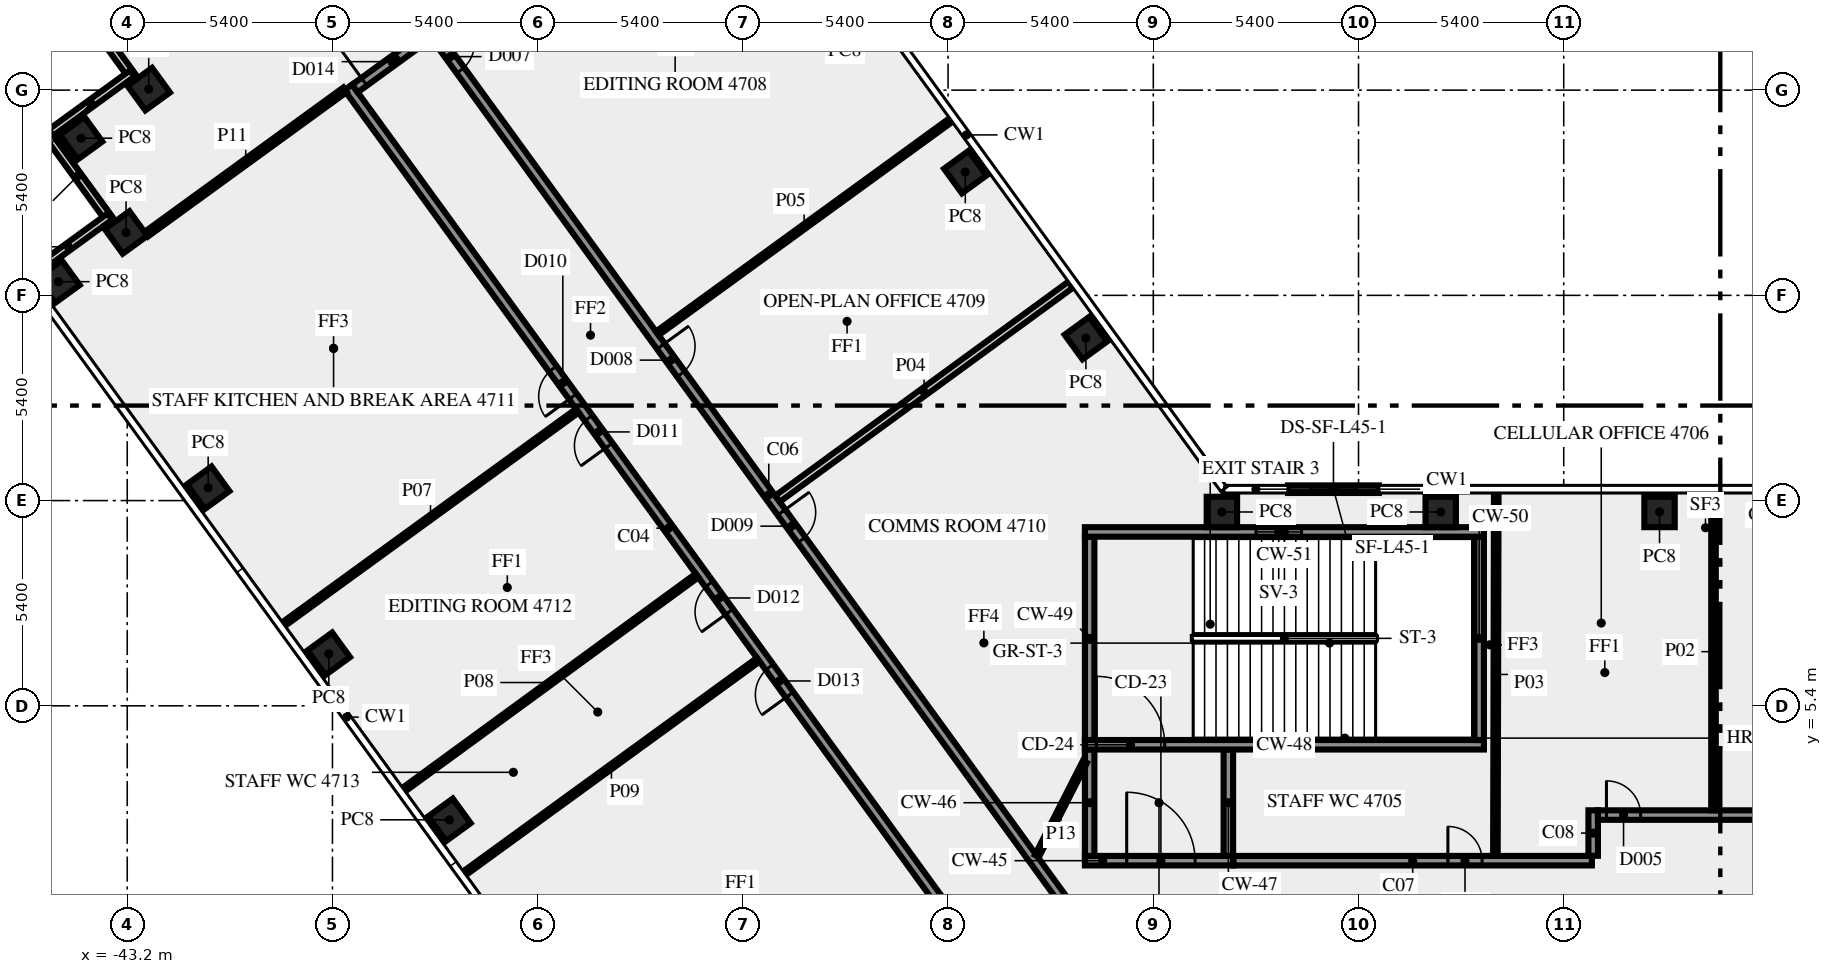
"""IFC4 building model, lengths in metres.
Left out: names, types, materials, properties, quantities, classifications, styles, units other than length and angle.
Written with IfcOpenShell. Run it as: python <this file> out.ifc"""

import sys

from ifc_helpers import new_model, si_unit, direction, frame, frame_2d, origin, origin_2d, place, context, subcontext, project, spatial, rectangle, extrude, element, fill, save


model = new_model("IFC4")
c1 = context("Model", 3, precision=1e-05, world=origin(), true_north=direction((0.0, 1.0)))
c2 = subcontext(c1, "Body", "Model", "MODEL_VIEW")
j1 = project(units=[si_unit("LENGTHUNIT", "METRE"), si_unit("PLANEANGLEUNIT", "RADIAN")], contexts=[c1])
p1 = place(None, origin())
s1 = spatial("IfcSite", under=j1, at=p1, CompositionType="ELEMENT")
p2 = place(p1, origin())
s2 = spatial("IfcBuilding", under=s1, at=p2, CompositionType="ELEMENT")
p3 = place(p2, frame((0.0, 0.0, 202.0)))
s3 = spatial("IfcBuildingStorey", under=s2, at=p3, CompositionType="ELEMENT", Elevation=202.0)
for number, where, z_axis, x_axis in (
    (1, (-17.974, 15.075, 0.0), (0.0, 0.0, 1.0), (-0.588, 0.809, 0.0)),
    (2, (-21.147, 19.444, 0.0), (0.0, 0.0, 1.0), (-0.588, 0.809, 0.0)),
    (3, (-42.635, 21.626, 0.0), (0.0, 0.0, 1.0), (-0.809, -0.588, 0.0)),
    (4, (-44.415, 20.335, 0.0), (0.0, 0.0, 1.0), (0.588, -0.809, 0.0)),
    (5, (-43.231, 17.854, 0.0), (0.0, 0.0, 1.0), (0.588, -0.809, 0.0)),
    (6, (-45.01, 16.56, 0.0), (0.0, 0.0, 1.0), (0.588, -0.809, 0.0)),
    (7, (-41.07, 11.137, 0.0), (0.0, 0.0, 1.0), (0.588, -0.809, 0.0)),
    (8, (-37.896, 6.769, 0.0), (0.0, 0.0, 1.0), (0.588, -0.809, 0.0)),
    (9, (-34.722, 2.4, 0.0), (0.0, 0.0, 1.0), (0.588, -0.809, 0.0)),
    (10, (-2.879, 10.5, 0.0), (0.0, 0.0, 1.0), (-1.0, 0.0, 0.0)),
    (11, (-8.637, 10.5, 0.0), (0.0, 0.0, 1.0), (-1.0, 0.0, 0.0)),
    (12, (-14.395, 10.5, 0.0), (0.0, 0.0, 1.0), (-1.0, 0.0, 0.0)),
):
    element("IfcColumn", number, at=place(p3, frame(where, z_axis=z_axis, x_axis=x_axis)), inside=s3, PredefinedType="COLUMN", context=c2, shape_type="SweptSolid", body=[
        extrude(rectangle(XDim=0.8, YDim=0.8, at=origin_2d()), origin(), (0.0, 0.0, 1.0), 3.65),
    ])
p4 = place(p3, frame((-10.263, 11.1, 0.0), z_axis=(0.0, 0.0, 1.0), x_axis=(-1.0, 0.0, 0.0)))
e13 = element("IfcWall", 13, at=p4, inside=s3, PredefinedType="SOLIDWALL", context=c2, shape_type="SweptSolid", body=[
    extrude(rectangle(XDim=2.392, YDim=0.2, at=frame_2d((1.196, 0.0))), origin(), (0.0, 0.0, 1.0), 3.65),
])
p5 = place(p4, frame((0.596, 0.0, 1.0)))
e14 = element("IfcOpeningElement", 14, at=p5, cuts=e13, PredefinedType="OPENING", context=c2, shape_type="SweptSolid", body=[
    extrude(rectangle(XDim=1.2, YDim=1.2, at=frame_2d((0.6, 0.6))), frame((0.0, 0.11, 0.0), z_axis=(0.0, -1.0, 0.0), x_axis=(1.0, 0.0, 0.0)), (0.0, 0.0, 1.0), 0.22),
])
for number, where, z_axis, x_axis in (
    (15, (-44.699, 24.205, 0.0), (0.0, 0.0, 1.0), (0.588, -0.809, 0.0)),
    (16, (-43.061, 22.043, 0.0), (0.0, 0.0, 1.0), (-0.809, -0.588, 0.0)),
    (17, (-45.296, 20.434, 0.0), (0.0, 0.0, 1.0), (0.588, -0.809, 0.0)),
    (18, (-43.658, 18.272, 0.0), (0.0, 0.0, 1.0), (-0.809, -0.588, 0.0)),
):
    element("IfcWall", number, at=place(p3, frame(where, z_axis=z_axis, x_axis=x_axis)), inside=s3, PredefinedType="SOLIDWALL", context=c2, shape_type="SweptSolid", body=[
        extrude(rectangle(XDim=2.7, YDim=0.2, at=frame_2d((1.35, 0.0))), origin(), (0.0, 0.0, 1.0), 3.65),
    ])
p6 = place(p3, frame((-18.0, 1.325, 0.0), z_axis=(0.0, 0.0, 1.0), x_axis=(1.0, 0.0, 0.0)))
e19 = element("IfcWall", 19, at=p6, inside=s3, PredefinedType="SHEAR", context=c2, shape_type="SweptSolid", body=[
    extrude(rectangle(XDim=3.9, YDim=0.25, at=frame_2d((1.95, 0.0))), origin(), (0.0, 0.0, 1.0), 3.65),
])
p7 = place(p6, frame((1.1, 0.0, 0.0)))
e20 = element("IfcOpeningElement", 20, at=p7, cuts=e19, PredefinedType="OPENING", context=c2, shape_type="SweptSolid", body=[
    extrude(rectangle(XDim=1.8, YDim=2.1, at=frame_2d((0.9, 1.05))), frame((0.0, 0.135, 0.0), z_axis=(0.0, -1.0, 0.0), x_axis=(1.0, 0.0, 0.0)), (0.0, 0.0, 1.0), 0.27),
])
for number, where, z_axis, x_axis in (
    (21, (-17.875, 1.45, 0.0), (0.0, 0.0, 1.0), (0.0, 1.0, 0.0)),
    (22, (-14.225, 1.45, 0.0), (0.0, 0.0, 1.0), (0.0, 1.0, 0.0)),
):
    element("IfcWall", number, at=place(p3, frame(where, z_axis=z_axis, x_axis=x_axis)), inside=s3, PredefinedType="SHEAR", context=c2, shape_type="SweptSolid", body=[
        extrude(rectangle(XDim=2.8, YDim=0.25, at=frame_2d((1.4, 0.0))), origin(), (0.0, 0.0, 1.0), 3.65),
    ])
p8 = place(p3, frame((-18.0, 4.375, 0.0), z_axis=(0.0, 0.0, 1.0), x_axis=(1.0, 0.0, 0.0)))
e23 = element("IfcWall", 23, at=p8, inside=s3, PredefinedType="SHEAR", context=c2, shape_type="SweptSolid", body=[
    extrude(rectangle(XDim=10.5, YDim=0.25, at=frame_2d((5.25, 0.0))), origin(), (0.0, 0.0, 1.0), 3.65),
])
p9 = place(p8, frame((0.3, 0.0, 0.0)))
e24 = element("IfcOpeningElement", 24, at=p9, cuts=e23, PredefinedType="OPENING", context=c2, shape_type="SweptSolid", body=[
    extrude(rectangle(XDim=1.8, YDim=2.1, at=frame_2d((0.9, 1.05))), frame((0.0, 0.135, 0.0), z_axis=(0.0, -1.0, 0.0), x_axis=(1.0, 0.0, 0.0)), (0.0, 0.0, 1.0), 0.27),
])
for number, where, z_axis, x_axis in (
    (25, (-17.875, 4.5, 0.0), (0.0, 0.0, 1.0), (0.0, 1.0, 0.0)),
    (26, (-7.625, 4.5, 0.0), (0.0, 0.0, 1.0), (0.0, 1.0, 0.0)),
):
    element("IfcWall", number, at=place(p3, frame(where, z_axis=z_axis, x_axis=x_axis)), inside=s3, PredefinedType="SHEAR", context=c2, shape_type="SweptSolid", body=[
        extrude(rectangle(XDim=5.35, YDim=0.25, at=frame_2d((2.675, 0.0))), origin(), (0.0, 0.0, 1.0), 3.65),
    ])
p10 = place(p3, frame((-18.0, 9.975, 0.0), z_axis=(0.0, 0.0, 1.0), x_axis=(1.0, 0.0, 0.0)))
e27 = element("IfcWall", 27, at=p10, inside=s3, PredefinedType="SHEAR", context=c2, shape_type="SweptSolid", body=[
    extrude(rectangle(XDim=10.5, YDim=0.25, at=frame_2d((5.25, 0.0))), origin(), (0.0, 0.0, 1.0), 3.65),
])
p11 = place(p10, frame((4.5, 0.0, 1.0)))
e28 = element("IfcOpeningElement", 28, at=p11, cuts=e27, PredefinedType="OPENING", context=c2, shape_type="SweptSolid", body=[
    extrude(rectangle(XDim=1.2, YDim=1.2, at=frame_2d((0.6, 0.6))), frame((0.0, 0.135, 0.0), z_axis=(0.0, -1.0, 0.0), x_axis=(1.0, 0.0, 0.0)), (0.0, 0.0, 1.0), 0.27),
])
p12 = place(p3, frame((-20.531, -1.523, 0.0), z_axis=(0.0, 0.0, 1.0), x_axis=(-0.587785812891, 0.809016587076, 0.0)))
e29 = element("IfcWall", 29, at=p12, inside=s3, PredefinedType="SOLIDWALL", context=c2, shape_type="SweptSolid", body=[
    extrude(rectangle(XDim=28.67, YDim=0.25, at=frame_2d((14.335, 0.0))), origin(), (0.0, 0.0, 1.0), 3.65),
])
p13 = place(p12, frame((17.015, 0.0, 0.0)))
e30 = element("IfcOpeningElement", 30, at=p13, cuts=e29, PredefinedType="OPENING", context=c2, shape_type="SweptSolid", body=[
    extrude(rectangle(XDim=0.9, YDim=2.1, at=frame_2d((0.45, 1.05))), frame((0.0, 0.135, 0.0), z_axis=(0.0, -1.0, 0.0), x_axis=(1.0, 0.0, 0.0)), (0.0, 0.0, 1.0), 0.27),
])
p14 = place(p12, frame((8.916, 0.0, 0.0)))
e31 = element("IfcOpeningElement", 31, at=p14, cuts=e29, PredefinedType="OPENING", context=c2, shape_type="SweptSolid", body=[
    extrude(rectangle(XDim=0.9, YDim=2.1, at=frame_2d((0.45, 1.05))), frame((0.0, 0.135, 0.0), z_axis=(0.0, -1.0, 0.0), x_axis=(1.0, 0.0, 0.0)), (0.0, 0.0, 1.0), 0.27),
])
p15 = place(p12, frame((18.616, 0.0, 0.0)))
e32 = element("IfcOpeningElement", 32, at=p15, cuts=e29, PredefinedType="OPENING", context=c2, shape_type="SweptSolid", body=[
    extrude(rectangle(XDim=0.9, YDim=2.1, at=frame_2d((0.45, 1.05))), frame((0.0, 0.135, 0.0), z_axis=(0.0, -1.0, 0.0), x_axis=(1.0, 0.0, 0.0)), (0.0, 0.0, 1.0), 0.27),
])
p16 = place(p12, frame((11.615, 0.0, 0.0)))
e33 = element("IfcOpeningElement", 33, at=p16, cuts=e29, PredefinedType="OPENING", context=c2, shape_type="SweptSolid", body=[
    extrude(rectangle(XDim=0.9, YDim=2.1, at=frame_2d((0.45, 1.05))), frame((0.0, 0.135, 0.0), z_axis=(0.0, -1.0, 0.0), x_axis=(1.0, 0.0, 0.0)), (0.0, 0.0, 1.0), 0.27),
])
p17 = place(p3, frame((-37.208, 21.644, 0.0), z_axis=(0.0, 0.0, 1.0), x_axis=(0.809038743598, 0.587755315891, 0.0)))
e34 = element("IfcWall", 34, at=p17, inside=s3, PredefinedType="SOLIDWALL", context=c2, shape_type="SweptSolid", body=[
    extrude(rectangle(XDim=2.65, YDim=0.25, at=frame_2d((1.325, 0.0))), origin(), (0.0, 0.0, 1.0), 3.65),
])
p18 = place(p17, frame((0.3, 0.0, 0.0)))
e35 = element("IfcOpeningElement", 35, at=p18, cuts=e34, PredefinedType="OPENING", context=c2, shape_type="SweptSolid", body=[
    extrude(rectangle(XDim=1.8, YDim=2.1, at=frame_2d((0.9, 1.05))), frame((0.0, 0.135, 0.0), z_axis=(0.0, -1.0, 0.0), x_axis=(1.0, 0.0, 0.0)), (0.0, 0.0, 1.0), 0.27),
])
p19 = place(p3, frame((-35.092, 23.027, 0.0), z_axis=(0.0, 0.0, 1.0), x_axis=(0.587784076945, -0.809017848313, 0.0)))
e36 = element("IfcWall", 36, at=p19, inside=s3, PredefinedType="SOLIDWALL", context=c2, shape_type="SweptSolid", body=[
    extrude(rectangle(XDim=29.853, YDim=0.25, at=frame_2d((14.927, 0.0))), origin(), (0.0, 0.0, 1.0), 3.65),
])
p20 = place(p19, frame((10.095, 0.0, 0.0)))
e37 = element("IfcOpeningElement", 37, at=p20, cuts=e36, PredefinedType="OPENING", context=c2, shape_type="SweptSolid", body=[
    extrude(rectangle(XDim=0.9, YDim=2.1, at=frame_2d((0.45, 1.05))), frame((0.0, 0.135, 0.0), z_axis=(0.0, -1.0, 0.0), x_axis=(1.0, 0.0, 0.0)), (0.0, 0.0, 1.0), 0.27),
])
p21 = place(p19, frame((15.495, 0.0, 0.0)))
e38 = element("IfcOpeningElement", 38, at=p21, cuts=e36, PredefinedType="OPENING", context=c2, shape_type="SweptSolid", body=[
    extrude(rectangle(XDim=0.9, YDim=2.1, at=frame_2d((0.45, 1.05))), frame((0.0, 0.135, 0.0), z_axis=(0.0, -1.0, 0.0), x_axis=(1.0, 0.0, 0.0)), (0.0, 0.0, 1.0), 0.27),
])
p22 = place(p19, frame((0.224, 0.0, 0.0)))
e39 = element("IfcOpeningElement", 39, at=p22, cuts=e36, PredefinedType="OPENING", context=c2, shape_type="SweptSolid", body=[
    extrude(rectangle(XDim=0.9, YDim=2.1, at=frame_2d((0.45, 1.05))), frame((0.0, 0.135, 0.0), z_axis=(0.0, -1.0, 0.0), x_axis=(1.0, 0.0, 0.0)), (0.0, 0.0, 1.0), 0.27),
])
p23 = place(p3, frame((-14.09, 1.325, 0.0), z_axis=(0.0, 0.0, 1.0), x_axis=(1.0, 0.0, 0.0)))
e40 = element("IfcWall", 40, at=p23, inside=s3, PredefinedType="SOLIDWALL", context=c2, shape_type="SweptSolid", body=[
    extrude(rectangle(XDim=9.431, YDim=0.25, at=frame_2d((4.716, 0.0))), origin(), (0.0, 0.0, 1.0), 3.65),
])
p24 = place(p23, frame((5.642, 0.0, 0.0)))
e41 = element("IfcOpeningElement", 41, at=p24, cuts=e40, PredefinedType="OPENING", context=c2, shape_type="SweptSolid", body=[
    extrude(rectangle(XDim=0.9, YDim=2.1, at=frame_2d((0.45, 1.05))), frame((0.0, 0.135, 0.0), z_axis=(0.0, -1.0, 0.0), x_axis=(1.0, 0.0, 0.0)), (0.0, 0.0, 1.0), 0.27),
])
p25 = place(p3, frame((-4.625, 1.454, 0.0), z_axis=(0.0, 0.0, 1.0), x_axis=(0.0, 1.0, 0.0)))
e42 = element("IfcWall", 42, at=p25, inside=s3, PredefinedType="SOLIDWALL", context=c2, shape_type="SweptSolid", body=[
    extrude(rectangle(XDim=1.196, YDim=0.25, at=frame_2d((0.598, 0.0))), origin(), (0.0, 0.0, 1.0), 3.65),
])
p26 = place(p3, frame((-4.5, 2.525, 0.0), z_axis=(0.0, 0.0, 1.0), x_axis=(1.0, 0.0, 0.0)))
e43 = element("IfcWall", 43, at=p26, inside=s3, PredefinedType="SOLIDWALL", context=c2, shape_type="SweptSolid", body=[
    extrude(rectangle(XDim=11.25, YDim=0.25, at=frame_2d((5.625, 0.0))), origin(), (0.0, 0.0, 1.0), 3.65),
])
p27 = place(p26, frame((0.224, 0.0, 0.0)))
e44 = element("IfcOpeningElement", 44, at=p27, cuts=e43, PredefinedType="OPENING", context=c2, shape_type="SweptSolid", body=[
    extrude(rectangle(XDim=0.9, YDim=2.1, at=frame_2d((0.45, 1.05))), frame((0.0, 0.135, 0.0), z_axis=(0.0, -1.0, 0.0), x_axis=(1.0, 0.0, 0.0)), (0.0, 0.0, 1.0), 0.27),
])
p28 = place(p26, frame((9.576, 0.0, 0.0)))
e45 = element("IfcOpeningElement", 45, at=p28, cuts=e43, PredefinedType="OPENING", context=c2, shape_type="SweptSolid", body=[
    extrude(rectangle(XDim=1.2, YDim=2.1, at=frame_2d((0.6, 1.05))), frame((0.0, 0.135, 0.0), z_axis=(0.0, -1.0, 0.0), x_axis=(1.0, 0.0, 0.0)), (0.0, 0.0, 1.0), 0.27),
])
p29 = place(p3, frame((-1.459, 2.65, 0.0), z_axis=(0.0, 0.0, 1.0), x_axis=(0.0, 1.0, 0.0)))
e46 = element("IfcWall", 46, at=p29, inside=s3, PredefinedType="PARTITIONING", context=c2, shape_type="SweptSolid", body=[
    extrude(rectangle(XDim=8.35, YDim=0.12, at=frame_2d((4.175, 0.0))), origin(), (0.0, 0.0, 1.0), 2.85),
])
p30 = place(p3, frame((-7.175, 11.0, 0.0), z_axis=(0.0, 0.0, 1.0), x_axis=(-0.002377476217, -0.999997173799, 0.0)))
e47 = element("IfcWall", 47, at=p30, inside=s3, PredefinedType="PARTITIONING", context=c2, shape_type="SweptSolid", body=[
    extrude(rectangle(XDim=9.55, YDim=0.12, at=frame_2d((4.775, 0.0))), origin(), (0.0, 0.0, 1.0), 2.85),
])
p31 = place(p3, frame((-26.089, 10.848, 0.0), z_axis=(0.0, 0.0, 1.0), x_axis=(0.807661302092, 0.589646691759, 0.0)))
e48 = element("IfcWall", 48, at=p31, inside=s3, PredefinedType="SOLIDWALL", context=c2, shape_type="SweptSolid", body=[
    extrude(rectangle(XDim=9.55, YDim=0.2, at=frame_2d((4.775, 0.0))), origin(), (0.0, 0.0, 1.0), 2.85),
])
p32 = place(p3, frame((-21.525, 20.813, 0.0), z_axis=(0.0, 0.0, 1.0), x_axis=(-0.808994684961, -0.587815957341, 0.0)))
e49 = element("IfcWall", 49, at=p32, inside=s3, PredefinedType="PARTITIONING", context=c2, shape_type="SweptSolid", body=[
    extrude(rectangle(XDim=9.55, YDim=0.12, at=frame_2d((4.775, 0.0))), origin(), (0.0, 0.0, 1.0), 2.85),
])
p33 = place(p3, frame((-31.356, 13.164, 0.0), z_axis=(0.0, 0.0, 1.0), x_axis=(-0.809102944047, -0.587666934526, 0.0)))
e50 = element("IfcWall", 50, at=p33, inside=s3, PredefinedType="PARTITIONING", context=c2, shape_type="SweptSolid", body=[
    extrude(rectangle(XDim=9.55, YDim=0.12, at=frame_2d((4.775, 0.0))), origin(), (0.0, 0.0, 1.0), 2.85),
])
p34 = place(p3, frame((-35.919, 3.197, 0.0), z_axis=(0.0, 0.0, 1.0), x_axis=(0.807645841498, 0.589667868135, 0.0)))
e51 = element("IfcWall", 51, at=p34, inside=s3, PredefinedType="PARTITIONING", context=c2, shape_type="SweptSolid", body=[
    extrude(rectangle(XDim=9.551, YDim=0.12, at=frame_2d((4.775, 0.0))), origin(), (0.0, 0.0, 1.0), 2.85),
])
p35 = place(p3, frame((-26.595, 6.611, 0.0), z_axis=(0.0, 0.0, 1.0), x_axis=(-0.80900684162, -0.587799226107, 0.0)))
e52 = element("IfcWall", 52, at=p35, inside=s3, PredefinedType="PARTITIONING", context=c2, shape_type="SweptSolid", body=[
    extrude(rectangle(XDim=9.55, YDim=0.12, at=frame_2d((4.775, 0.0))), origin(), (0.0, 0.0, 1.0), 2.85),
])
p36 = place(p3, frame((-42.698, 17.81, 0.0), z_axis=(0.0, 0.0, 1.0), x_axis=(0.80901688725, 0.587785399737, 0.0)))
e53 = element("IfcWall", 53, at=p36, inside=s3, PredefinedType="PARTITIONING", context=c2, shape_type="SweptSolid", body=[
    extrude(rectangle(XDim=6.465, YDim=0.15, at=frame_2d((3.232, 0.0))), origin(), (0.0, 0.0, 1.0), 3.65),
])
p37 = place(p3, frame((-19.261, 1.45, 0.0), z_axis=(0.0, 0.0, 1.0), x_axis=(0.453950796792, 0.891026752736, 0.0)))
e54 = element("IfcWall", 54, at=p37, inside=s3, PredefinedType="PARTITIONING", context=c2, shape_type="SweptSolid", body=[
    extrude(rectangle(XDim=2.778, YDim=0.12, at=frame_2d((1.389, 0.0))), origin(), (0.0, 0.0, 1.0), 3.65),
])
p38 = place(p5, origin())
e55 = element("IfcWindow", 55, at=p38, inside=s3, PartitioningType="SINGLE_PANEL", PredefinedType="WINDOW", context=c2, shape_type="SweptSolid", body=[
    extrude(rectangle(XDim=1.2, YDim=1.2, at=frame_2d((0.6, 0.6))), frame((0.0, 0.03, 0.0), z_axis=(0.0, -1.0, 0.0), x_axis=(1.0, 0.0, 0.0)), (0.0, 0.0, 1.0), 0.06),
])
fill(e14, e55)
p39 = place(p7, origin())
e56 = element("IfcDoor", 56, at=p39, inside=s3, OperationType="DOUBLE_DOOR_SINGLE_SWING", PredefinedType="DOOR", context=c2, shape_type="SweptSolid", body=[
    extrude(rectangle(XDim=1.8, YDim=2.1, at=frame_2d((0.9, 1.05))), frame((0.0, 0.025, 0.0), z_axis=(0.0, -1.0, 0.0), x_axis=(1.0, 0.0, 0.0)), (0.0, 0.0, 1.0), 0.05),
])
fill(e20, e56)
p40 = place(p9, origin())
e57 = element("IfcDoor", 57, at=p40, inside=s3, OperationType="DOUBLE_DOOR_SINGLE_SWING", PredefinedType="DOOR", context=c2, shape_type="SweptSolid", body=[
    extrude(rectangle(XDim=1.8, YDim=2.1, at=frame_2d((0.9, 1.05))), frame((0.0, 0.025, 0.0), z_axis=(0.0, -1.0, 0.0), x_axis=(1.0, 0.0, 0.0)), (0.0, 0.0, 1.0), 0.05),
])
fill(e24, e57)
p41 = place(p11, origin())
e58 = element("IfcWindow", 58, at=p41, inside=s3, PartitioningType="SINGLE_PANEL", PredefinedType="WINDOW", context=c2, shape_type="SweptSolid", body=[
    extrude(rectangle(XDim=1.2, YDim=1.2, at=frame_2d((0.6, 0.6))), frame((0.0, 0.03, 0.0), z_axis=(0.0, -1.0, 0.0), x_axis=(1.0, 0.0, 0.0)), (0.0, 0.0, 1.0), 0.06),
])
fill(e28, e58)
p42 = place(p27, origin())
e59 = element("IfcDoor", 59, at=p42, inside=s3, OperationType="SINGLE_SWING_LEFT", PredefinedType="DOOR", context=c2, shape_type="SweptSolid", body=[
    extrude(rectangle(XDim=0.9, YDim=2.1, at=frame_2d((0.45, 1.05))), frame((0.0, 0.025, 0.0), z_axis=(0.0, -1.0, 0.0), x_axis=(1.0, 0.0, 0.0)), (0.0, 0.0, 1.0), 0.05),
])
fill(e44, e59)
p43 = place(p20, origin())
e60 = element("IfcDoor", 60, at=p43, inside=s3, OperationType="SINGLE_SWING_LEFT", PredefinedType="DOOR", context=c2, shape_type="SweptSolid", body=[
    extrude(rectangle(XDim=0.9, YDim=2.1, at=frame_2d((0.45, 1.05))), frame((0.0, 0.025, 0.0), z_axis=(0.0, -1.0, 0.0), x_axis=(1.0, 0.0, 0.0)), (0.0, 0.0, 1.0), 0.05),
])
fill(e37, e60)
p44 = place(p21, origin())
e61 = element("IfcDoor", 61, at=p44, inside=s3, OperationType="SINGLE_SWING_LEFT", PredefinedType="DOOR", context=c2, shape_type="SweptSolid", body=[
    extrude(rectangle(XDim=0.9, YDim=2.1, at=frame_2d((0.45, 1.05))), frame((0.0, 0.025, 0.0), z_axis=(0.0, -1.0, 0.0), x_axis=(1.0, 0.0, 0.0)), (0.0, 0.0, 1.0), 0.05),
])
fill(e38, e61)
p45 = place(p22, origin())
e62 = element("IfcDoor", 62, at=p45, inside=s3, OperationType="SINGLE_SWING_LEFT", PredefinedType="DOOR", context=c2, shape_type="SweptSolid", body=[
    extrude(rectangle(XDim=0.9, YDim=2.1, at=frame_2d((0.45, 1.05))), frame((0.0, 0.025, 0.0), z_axis=(0.0, -1.0, 0.0), x_axis=(1.0, 0.0, 0.0)), (0.0, 0.0, 1.0), 0.05),
])
fill(e39, e62)
p46 = place(p13, origin())
e63 = element("IfcDoor", 63, at=p46, inside=s3, OperationType="SINGLE_SWING_RIGHT", PredefinedType="DOOR", context=c2, shape_type="SweptSolid", body=[
    extrude(rectangle(XDim=0.9, YDim=2.1, at=frame_2d((0.45, 1.05))), frame((0.0, 0.025, 0.0), z_axis=(0.0, -1.0, 0.0), x_axis=(1.0, 0.0, 0.0)), (0.0, 0.0, 1.0), 0.05),
])
fill(e30, e63)
p47 = place(p14, origin())
e64 = element("IfcDoor", 64, at=p47, inside=s3, OperationType="SINGLE_SWING_RIGHT", PredefinedType="DOOR", context=c2, shape_type="SweptSolid", body=[
    extrude(rectangle(XDim=0.9, YDim=2.1, at=frame_2d((0.45, 1.05))), frame((0.0, 0.025, 0.0), z_axis=(0.0, -1.0, 0.0), x_axis=(1.0, 0.0, 0.0)), (0.0, 0.0, 1.0), 0.05),
])
fill(e31, e64)
p48 = place(p18, origin())
e65 = element("IfcDoor", 65, at=p48, inside=s3, OperationType="DOUBLE_DOOR_SINGLE_SWING", PredefinedType="DOOR", context=c2, shape_type="SweptSolid", body=[
    extrude(rectangle(XDim=1.8, YDim=2.1, at=frame_2d((0.9, 1.05))), frame((0.0, 0.025, 0.0), z_axis=(0.0, -1.0, 0.0), x_axis=(1.0, 0.0, 0.0)), (0.0, 0.0, 1.0), 0.05),
])
fill(e35, e65)
p49 = place(p15, origin())
e66 = element("IfcDoor", 66, at=p49, inside=s3, OperationType="SINGLE_SWING_LEFT", PredefinedType="DOOR", context=c2, shape_type="SweptSolid", body=[
    extrude(rectangle(XDim=0.9, YDim=2.1, at=frame_2d((0.45, 1.05))), frame((0.0, 0.025, 0.0), z_axis=(0.0, -1.0, 0.0), x_axis=(1.0, 0.0, 0.0)), (0.0, 0.0, 1.0), 0.05),
])
fill(e32, e66)
p50 = place(p24, origin())
e67 = element("IfcDoor", 67, at=p50, inside=s3, OperationType="SINGLE_SWING_RIGHT", PredefinedType="DOOR", context=c2, shape_type="SweptSolid", body=[
    extrude(rectangle(XDim=0.9, YDim=2.1, at=frame_2d((0.45, 1.05))), frame((0.0, 0.025, 0.0), z_axis=(0.0, -1.0, 0.0), x_axis=(1.0, 0.0, 0.0)), (0.0, 0.0, 1.0), 0.05),
])
fill(e41, e67)
p51 = place(p16, origin())
e68 = element("IfcDoor", 68, at=p51, inside=s3, OperationType="SINGLE_SWING_RIGHT", PredefinedType="DOOR", context=c2, shape_type="SweptSolid", body=[
    extrude(rectangle(XDim=0.9, YDim=2.1, at=frame_2d((0.45, 1.05))), frame((0.0, 0.025, 0.0), z_axis=(0.0, -1.0, 0.0), x_axis=(1.0, 0.0, 0.0)), (0.0, 0.0, 1.0), 0.05),
])
fill(e33, e68)
save(model, sys.argv[1])
